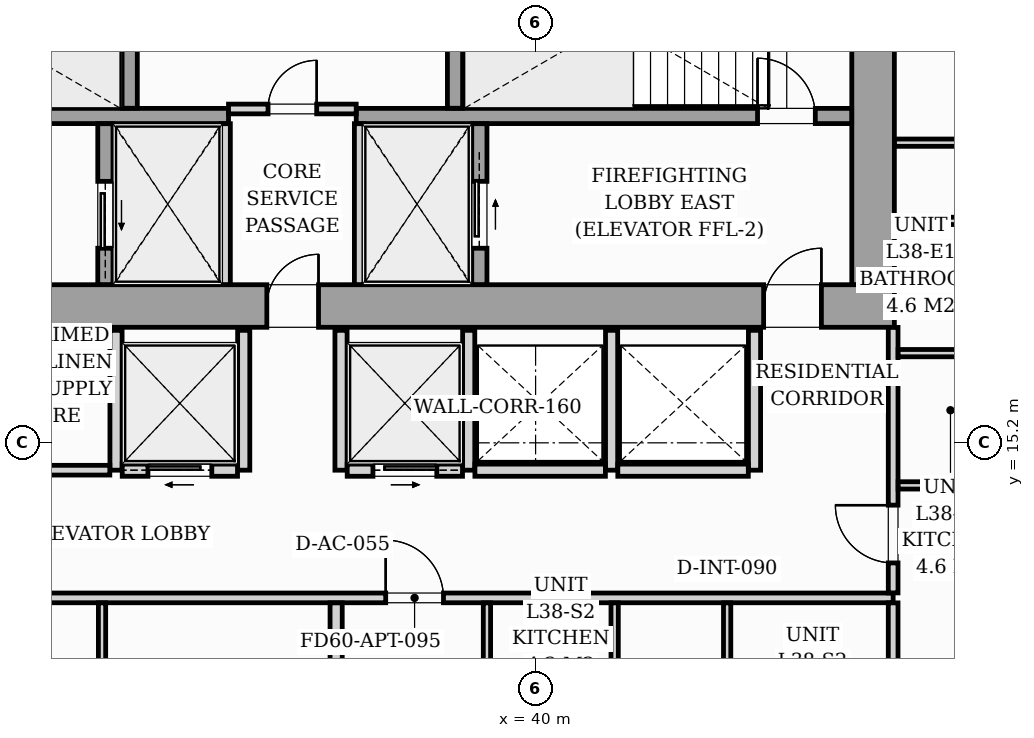
"""IFC4 building model, lengths in metres.
Left out: names, types, materials, properties, quantities, classifications, styles, units other than length and angle.
Written with IfcOpenShell. Run it as: python <this file> out.ifc"""

import sys

from ifc_helpers import new_model, si_unit, direction, frame, frame_2d, origin, origin_2d, place, context, subcontext, project, spatial, rectangle, i_section, extrude, source, transform, mapped, element, fill, save


model = new_model("IFC4")
c1 = context("Model", 3, precision=1e-05, world=origin(), true_north=direction((0.0, 1.0)))
c2 = subcontext(c1, "Body", "Model", "MODEL_VIEW")
j1 = project(units=[si_unit("LENGTHUNIT", "METRE"), si_unit("PLANEANGLEUNIT", "RADIAN")], contexts=[c1])
p1 = place(None, origin())
s1 = spatial("IfcSite", under=j1, at=p1, CompositionType="ELEMENT")
p2 = place(p1, origin())
s2 = spatial("IfcBuilding", under=s1, at=p2, CompositionType="ELEMENT")
p3 = place(p2, frame((0.0, 0.0, 134.2)))
s3 = spatial("IfcBuildingStorey", under=s2, at=p3, CompositionType="ELEMENT", Elevation=134.2)
m1 = source(origin(), c2, "Body", "SweptSolid", [
    extrude(i_section(OverallWidth=0.421, OverallDepth=0.465, WebThickness=0.045, FlangeThickness=0.073, FilletRadius=0.018, at=origin_2d()), origin(), (0.0, 0.0, 1.0), 3.196),
])
for number, where, z_axis, x_axis in (
    (1, (33.12, 17.4, 0.002), (0.0, 0.0, 1.0), (1.0, 0.0, 0.0)),
    (2, (38.88, 17.4, 0.002), (0.0, 0.0, 1.0), (1.0, 0.0, 0.0)),
    (3, (45.6, 17.4, 0.002), (0.0, 0.0, 1.0), (1.0, 0.0, 0.0)),
):
    element("IfcColumn", number, at=place(p3, frame(where, z_axis=z_axis, x_axis=x_axis)), inside=s3, PredefinedType="PILASTER", context=c2, shape_type="MappedRepresentation", body=[
        mapped(m1, transform((0.0, 0.0, 0.0), scale=1.0)),
    ])
p4 = place(p3, frame((26.1, 17.45, 0.0), z_axis=(0.0, 0.0, 1.0), x_axis=(1.0, 0.0, 0.0)))
e4 = element("IfcWall", 4, at=p4, inside=s3, PredefinedType="SHEAR", context=c2, shape_type="SweptSolid", body=[
    extrude(rectangle(XDim=19.8, YDim=0.7, at=frame_2d((9.9, 0.0))), origin(), (0.0, 0.0, 1.0), 3.2),
])
p5 = place(p4, frame((1.05, 0.0, 0.0)))
e5 = element("IfcOpeningElement", 5, at=p5, cuts=e4, PredefinedType="OPENING", context=c2, shape_type="SweptSolid", body=[
    extrude(rectangle(XDim=0.95, YDim=2.06, at=frame_2d((0.475, 1.03))), frame((0.0, 0.36, 0.0), z_axis=(0.0, -1.0, 0.0), x_axis=(1.0, 0.0, 0.0)), (0.0, 0.0, 1.0), 0.72),
])
p6 = place(p4, frame((9.48, 0.0, 0.0)))
e6 = element("IfcOpeningElement", 6, at=p6, cuts=e4, PredefinedType="OPENING", context=c2, shape_type="SweptSolid", body=[
    extrude(rectangle(XDim=0.85, YDim=2.0, at=frame_2d((0.425, 1.0))), frame((0.0, 0.36, 0.0), z_axis=(0.0, -1.0, 0.0), x_axis=(1.0, 0.0, 0.0)), (0.0, 0.0, 1.0), 0.72),
])
p7 = place(p4, frame((17.65, 0.0, 0.0)))
e7 = element("IfcOpeningElement", 7, at=p7, cuts=e4, PredefinedType="OPENING", context=c2, shape_type="SweptSolid", body=[
    extrude(rectangle(XDim=0.95, YDim=2.06, at=frame_2d((0.475, 1.03))), frame((0.0, 0.36, 0.0), z_axis=(0.0, -1.0, 0.0), x_axis=(1.0, 0.0, 0.0)), (0.0, 0.0, 1.0), 0.72),
])
p8 = place(p3, frame((45.55, 17.802, 0.0), z_axis=(0.0, 0.0, 1.0), x_axis=(0.0, 1.0, 0.0)))
e8 = element("IfcWall", 8, at=p8, inside=s3, PredefinedType="SHEAR", context=c2, shape_type="SweptSolid", body=[
    extrude(rectangle(XDim=5.796, YDim=0.7, at=frame_2d((2.898, 0.0))), origin(), (0.0, 0.0, 1.0), 3.2),
])
p9 = place(p3, frame((26.802, 20.575, 0.0), z_axis=(0.0, 0.0, 1.0), x_axis=(1.0, 0.0, 0.0)))
e9 = element("IfcWall", 9, at=p9, inside=s3, PredefinedType="SOLIDWALL", context=c2, shape_type="SweptSolid", body=[
    extrude(rectangle(XDim=8.148, YDim=0.25, at=frame_2d((4.074, 0.0))), origin(), (0.0, 0.0, 1.0), 3.2),
])
p10 = place(p9, frame((0.348, 0.0, 0.0)))
e10 = element("IfcOpeningElement", 10, at=p10, cuts=e9, PredefinedType="OPENING", context=c2, shape_type="SweptSolid", body=[
    extrude(rectangle(XDim=0.95, YDim=2.06, at=frame_2d((0.475, 1.03))), frame((0.0, 0.135, 0.0), z_axis=(0.0, -1.0, 0.0), x_axis=(1.0, 0.0, 0.0)), (0.0, 0.0, 1.0), 0.27),
])
p11 = place(p3, frame((37.05, 20.575, 0.0), z_axis=(0.0, 0.0, 1.0), x_axis=(1.0, 0.0, 0.0)))
e11 = element("IfcWall", 11, at=p11, inside=s3, PredefinedType="SOLIDWALL", context=c2, shape_type="SweptSolid", body=[
    extrude(rectangle(XDim=8.148, YDim=0.25, at=frame_2d((4.074, 0.0))), origin(), (0.0, 0.0, 1.0), 3.2),
])
p12 = place(p11, frame((6.6, 0.0, 0.0)))
e12 = element("IfcOpeningElement", 12, at=p12, cuts=e11, PredefinedType="OPENING", context=c2, shape_type="SweptSolid", body=[
    extrude(rectangle(XDim=0.95, YDim=2.06, at=frame_2d((0.475, 1.03))), frame((0.0, 0.135, 0.0), z_axis=(0.0, -1.0, 0.0), x_axis=(1.0, 0.0, 0.0)), (0.0, 0.0, 1.0), 0.27),
])
for number, where, z_axis, x_axis in (
    (13, (33.325, 20.702, 0.0), (0.0, 0.0, 1.0), (0.0, 1.0, 0.0)),
    (14, (38.675, 20.702, 0.0), (0.0, 0.0, 1.0), (0.0, 1.0, 0.0)),
):
    element("IfcWall", number, at=place(p3, frame(where, z_axis=z_axis, x_axis=x_axis)), inside=s3, PredefinedType="SOLIDWALL", context=c2, shape_type="SweptSolid", body=[
        extrude(rectangle(XDim=2.896, YDim=0.25, at=frame_2d((1.448, 0.0))), origin(), (0.0, 0.0, 1.0), 3.2),
    ])
p13 = place(p3, frame((32.925, 17.802, 0.0), z_axis=(0.0, 0.0, 1.0), x_axis=(0.0, 1.0, 0.0)))
e15 = element("IfcWall", 15, at=p13, inside=s3, PredefinedType="SOLIDWALL", context=c2, shape_type="SweptSolid", body=[
    extrude(rectangle(XDim=2.646, YDim=0.25, at=frame_2d((1.323, 0.0))), origin(), (0.0, 0.0, 1.0), 3.2),
])
p14 = place(p13, frame((0.598, 0.0, 0.0)))
e16 = element("IfcOpeningElement", 16, at=p14, cuts=e15, PredefinedType="OPENING", context=c2, shape_type="SweptSolid", body=[
    extrude(rectangle(XDim=1.1, YDim=2.08, at=frame_2d((0.55, 1.04))), frame((0.0, 0.135, 0.0), z_axis=(0.0, -1.0, 0.0), x_axis=(1.0, 0.0, 0.0)), (0.0, 0.0, 1.0), 0.27),
])
for number, where, z_axis, x_axis in (
    (17, (34.9, 17.802, 0.0), (0.0, 0.0, 1.0), (0.0, 1.0, 0.0)),
    (18, (37.1, 17.802, 0.0), (0.0, 0.0, 1.0), (0.0, 1.0, 0.0)),
):
    element("IfcWall", number, at=place(p3, frame(where, z_axis=z_axis, x_axis=x_axis)), inside=s3, PredefinedType="PARTITIONING", context=c2, shape_type="SweptSolid", body=[
        extrude(rectangle(XDim=2.646, YDim=0.16, at=frame_2d((1.323, 0.0))), origin(), (0.0, 0.0, 1.0), 2.94),
    ])
p15 = place(p3, frame((39.075, 17.802, 0.0), z_axis=(0.0, 0.0, 1.0), x_axis=(0.0, 1.0, 0.0)))
e19 = element("IfcWall", 19, at=p15, inside=s3, PredefinedType="SOLIDWALL", context=c2, shape_type="SweptSolid", body=[
    extrude(rectangle(XDim=2.646, YDim=0.25, at=frame_2d((1.323, 0.0))), origin(), (0.0, 0.0, 1.0), 3.2),
])
p16 = place(p15, frame((0.598, 0.0, 0.0)))
e20 = element("IfcOpeningElement", 20, at=p16, cuts=e19, PredefinedType="OPENING", context=c2, shape_type="SweptSolid", body=[
    extrude(rectangle(XDim=1.1, YDim=2.08, at=frame_2d((0.55, 1.04))), frame((0.0, 0.135, 0.0), z_axis=(0.0, -1.0, 0.0), x_axis=(1.0, 0.0, 0.0)), (0.0, 0.0, 1.0), 0.27),
])
p17 = place(p3, frame((34.95, 20.69, 0.0), z_axis=(0.0, 0.0, 1.0), x_axis=(1.0, 0.0, 0.0)))
e21 = element("IfcWall", 21, at=p17, inside=s3, PredefinedType="PARTITIONING", context=c2, shape_type="SweptSolid", body=[
    extrude(rectangle(XDim=2.1, YDim=0.16, at=frame_2d((1.05, 0.0))), origin(), (0.0, 0.0, 1.0), 2.94),
])
p18 = place(p17, frame((0.65, 0.0, 0.0)))
e22 = element("IfcOpeningElement", 22, at=p18, cuts=e21, PredefinedType="OPENING", context=c2, shape_type="SweptSolid", body=[
    extrude(rectangle(XDim=0.8, YDim=2.05, at=frame_2d((0.4, 1.025))), frame((0.0, 0.09, 0.0), z_axis=(0.0, -1.0, 0.0), x_axis=(1.0, 0.0, 0.0)), (0.0, 0.0, 1.0), 0.18),
])
p19 = place(p3, frame((33.1, 14.75, 0.0), z_axis=(0.0, 0.0, 1.0), x_axis=(0.0, 1.0, 0.0)))
e23 = element("IfcWall", 23, at=p19, inside=s3, PredefinedType="PARTITIONING", context=c2, shape_type="SweptSolid", body=[
    extrude(rectangle(XDim=2.3, YDim=0.2, at=frame_2d((1.15, 0.0))), origin(), (0.0, 0.0, 1.0), 2.94),
])
p20 = place(p3, frame((28.482, 14.75, 0.0), z_axis=(0.0, 0.0, 1.0), x_axis=(1.0, 0.0, 0.0)))
e24 = element("IfcWall", 24, at=p20, inside=s3, PredefinedType="PARTITIONING", context=c2, shape_type="SweptSolid", body=[
    extrude(rectangle(XDim=4.516, YDim=0.16, at=frame_2d((2.258, 0.0))), origin(), (0.0, 0.0, 1.0), 2.94),
])
p21 = place(p20, frame((1.868, 0.0, 0.0)))
e25 = element("IfcOpeningElement", 25, at=p21, cuts=e24, PredefinedType="OPENING", context=c2, shape_type="SweptSolid", body=[
    extrude(rectangle(XDim=0.8, YDim=2.05, at=frame_2d((0.4, 1.025))), frame((0.0, 0.09, 0.0), z_axis=(0.0, -1.0, 0.0), x_axis=(1.0, 0.0, 0.0)), (0.0, 0.0, 1.0), 0.18),
])
p22 = place(p3, frame((35.2, 14.75, 0.0), z_axis=(0.0, 0.0, 1.0), x_axis=(0.0, 1.0, 0.0)))
e26 = element("IfcWall", 26, at=p22, inside=s3, PredefinedType="PARTITIONING", context=c2, shape_type="SweptSolid", body=[
    extrude(rectangle(XDim=2.3, YDim=0.2, at=frame_2d((1.15, 0.0))), origin(), (0.0, 0.0, 1.0), 2.94),
])
p23 = place(p3, frame((33.202, 14.75, 0.0), z_axis=(0.0, 0.0, 1.0), x_axis=(1.0, 0.0, 0.0)))
e27 = element("IfcWall", 27, at=p23, inside=s3, PredefinedType="PARTITIONING", context=c2, shape_type="SweptSolid", body=[
    extrude(rectangle(XDim=1.896, YDim=0.2, at=frame_2d((0.948, 0.0))), origin(), (0.0, 0.0, 1.0), 2.94),
])
p24 = place(p23, frame((0.423, 0.0, 0.0)))
e28 = element("IfcOpeningElement", 28, at=p24, cuts=e27, PredefinedType="OPENING", context=c2, shape_type="SweptSolid", body=[
    extrude(rectangle(XDim=1.05, YDim=2.08, at=frame_2d((0.525, 1.04))), frame((0.0, 0.11, 0.0), z_axis=(0.0, -1.0, 0.0), x_axis=(1.0, 0.0, 0.0)), (0.0, 0.0, 1.0), 0.22),
])
for number, where, z_axis, x_axis in (
    (29, (36.8, 14.75, 0.0), (0.0, 0.0, 1.0), (0.0, 1.0, 0.0)),
    (30, (38.9, 14.75, 0.0), (0.0, 0.0, 1.0), (0.0, 1.0, 0.0)),
):
    element("IfcWall", number, at=place(p3, frame(where, z_axis=z_axis, x_axis=x_axis)), inside=s3, PredefinedType="PARTITIONING", context=c2, shape_type="SweptSolid", body=[
        extrude(rectangle(XDim=2.3, YDim=0.2, at=frame_2d((1.15, 0.0))), origin(), (0.0, 0.0, 1.0), 2.94),
    ])
p25 = place(p3, frame((36.902, 14.75, 0.0), z_axis=(0.0, 0.0, 1.0), x_axis=(1.0, 0.0, 0.0)))
e31 = element("IfcWall", 31, at=p25, inside=s3, PredefinedType="PARTITIONING", context=c2, shape_type="SweptSolid", body=[
    extrude(rectangle(XDim=1.896, YDim=0.2, at=frame_2d((0.948, 0.0))), origin(), (0.0, 0.0, 1.0), 2.94),
])
p26 = place(p25, frame((0.423, 0.0, 0.0)))
e32 = element("IfcOpeningElement", 32, at=p26, cuts=e31, PredefinedType="OPENING", context=c2, shape_type="SweptSolid", body=[
    extrude(rectangle(XDim=1.05, YDim=2.08, at=frame_2d((0.525, 1.04))), frame((0.0, 0.11, 0.0), z_axis=(0.0, -1.0, 0.0), x_axis=(1.0, 0.0, 0.0)), (0.0, 0.0, 1.0), 0.22),
])
for number, where, z_axis, x_axis in (
    (33, (41.25, 14.75, 0.0), (0.0, 0.0, 1.0), (0.0, 1.0, 0.0)),
    (34, (43.6, 14.75, 0.0), (0.0, 0.0, 1.0), (0.0, 1.0, 0.0)),
):
    element("IfcWall", number, at=place(p3, frame(where, z_axis=z_axis, x_axis=x_axis)), inside=s3, PredefinedType="PARTITIONING", context=c2, shape_type="SweptSolid", body=[
        extrude(rectangle(XDim=2.3, YDim=0.2, at=frame_2d((1.15, 0.0))), origin(), (0.0, 0.0, 1.0), 2.94),
    ])
for number, where, z_axis, x_axis in (
    (35, (39.002, 14.75, 0.0), (0.0, 0.0, 1.0), (1.0, 0.0, 0.0)),
    (36, (41.352, 14.75, 0.0), (0.0, 0.0, 1.0), (1.0, 0.0, 0.0)),
):
    element("IfcWall", number, at=place(p3, frame(where, z_axis=z_axis, x_axis=x_axis)), inside=s3, PredefinedType="PARTITIONING", context=c2, shape_type="SweptSolid", body=[
        extrude(rectangle(XDim=2.146, YDim=0.2, at=frame_2d((1.073, 0.0))), origin(), (0.0, 0.0, 1.0), 2.94),
    ])
p27 = place(p3, frame((22.05, 12.65, 0.0), z_axis=(0.0, 0.0, 1.0), x_axis=(1.0, 0.0, 0.0)))
e37 = element("IfcWall", 37, at=p27, inside=s3, PredefinedType="PARTITIONING", context=c2, shape_type="SweptSolid", body=[
    extrude(rectangle(XDim=23.83, YDim=0.16, at=frame_2d((11.915, 0.0))), origin(), (0.0, 0.0, 1.0), 2.94),
])
p28 = place(p27, frame((3.0, 0.0, 0.0)))
e38 = element("IfcOpeningElement", 38, at=p28, cuts=e37, PredefinedType="OPENING", context=c2, shape_type="SweptSolid", body=[
    extrude(rectangle(XDim=0.95, YDim=2.06, at=frame_2d((0.475, 1.03))), frame((0.0, 0.09, 0.0), z_axis=(0.0, -1.0, 0.0), x_axis=(1.0, 0.0, 0.0)), (0.0, 0.0, 1.0), 0.18),
])
p29 = place(p27, frame((15.485, 0.0, 0.0)))
e39 = element("IfcOpeningElement", 39, at=p29, cuts=e37, PredefinedType="OPENING", context=c2, shape_type="SweptSolid", body=[
    extrude(rectangle(XDim=0.95, YDim=2.06, at=frame_2d((0.475, 1.03))), frame((0.0, 0.09, 0.0), z_axis=(0.0, -1.0, 0.0), x_axis=(1.0, 0.0, 0.0)), (0.0, 0.0, 1.0), 0.18),
])
p30 = place(p3, frame((45.88, 5.958, 0.0), z_axis=(0.0, 0.0, 1.0), x_axis=(0.0, 1.0, 0.0)))
e40 = element("IfcWall", 40, at=p30, inside=s3, PredefinedType="PARTITIONING", context=c2, shape_type="SweptSolid", body=[
    extrude(rectangle(XDim=6.61, YDim=0.16, at=frame_2d((3.305, 0.0))), origin(), (0.0, 0.0, 1.0), 2.94),
])
p31 = place(p3, frame((45.88, 12.732, 0.0), z_axis=(0.0, 0.0, 1.0), x_axis=(0.0, 1.0, 0.0)))
e41 = element("IfcWall", 41, at=p31, inside=s3, PredefinedType="PARTITIONING", context=c2, shape_type="SweptSolid", body=[
    extrude(rectangle(XDim=4.366, YDim=0.16, at=frame_2d((2.183, 0.0))), origin(), (0.0, 0.0, 1.0), 2.94),
])
p32 = place(p31, frame((0.493, 0.0, 0.0)))
e42 = element("IfcOpeningElement", 42, at=p32, cuts=e41, PredefinedType="OPENING", context=c2, shape_type="SweptSolid", body=[
    extrude(rectangle(XDim=0.95, YDim=2.06, at=frame_2d((0.475, 1.03))), frame((0.0, 0.09, 0.0), z_axis=(0.0, -1.0, 0.0), x_axis=(1.0, 0.0, 0.0)), (0.0, 0.0, 1.0), 0.18),
])
p33 = place(p3, frame((32.87, 7.028, 0.0), z_axis=(0.0, 0.0, 1.0), x_axis=(0.0, 1.0, 0.0)))
e43 = element("IfcWall", 43, at=p33, inside=s3, PredefinedType="PARTITIONING", context=c2, shape_type="SweptSolid", body=[
    extrude(rectangle(XDim=5.54, YDim=0.12, at=frame_2d((2.77, 0.0))), origin(), (0.0, 0.0, 1.0), 2.94),
])
p34 = place(p33, frame((2.272, 0.0, 0.0)))
e44 = element("IfcOpeningElement", 44, at=p34, cuts=e43, PredefinedType="OPENING", context=c2, shape_type="SweptSolid", body=[
    extrude(rectangle(XDim=0.9, YDim=2.05, at=frame_2d((0.45, 1.025))), frame((0.0, 0.07, 0.0), z_axis=(0.0, -1.0, 0.0), x_axis=(1.0, 0.0, 0.0)), (0.0, 0.0, 1.0), 0.14),
])
p35 = place(p3, frame((36.72, 6.658, 0.0), z_axis=(0.0, 0.0, 1.0), x_axis=(0.0, 1.0, 0.0)))
e45 = element("IfcWall", 45, at=p35, inside=s3, PredefinedType="PARTITIONING", context=c2, shape_type="SweptSolid", body=[
    extrude(rectangle(XDim=5.91, YDim=0.2, at=frame_2d((2.955, 0.0))), origin(), (0.0, 0.0, 1.0), 2.94),
])
p36 = place(p3, frame((43.15, 6.221, 0.0), z_axis=(0.0, 0.0, 1.0), x_axis=(0.0, 1.0, 0.0)))
e46 = element("IfcWall", 46, at=p36, inside=s3, PredefinedType="PARTITIONING", context=c2, shape_type="SweptSolid", body=[
    extrude(rectangle(XDim=6.347, YDim=0.12, at=frame_2d((3.173, 0.0))), origin(), (0.0, 0.0, 1.0), 2.94),
])
p37 = place(p36, frame((3.079, 0.0, 0.0)))
e47 = element("IfcOpeningElement", 47, at=p37, cuts=e46, PredefinedType="OPENING", context=c2, shape_type="SweptSolid", body=[
    extrude(rectangle(XDim=0.9, YDim=2.05, at=frame_2d((0.45, 1.025))), frame((0.0, 0.07, 0.0), z_axis=(0.0, -1.0, 0.0), x_axis=(1.0, 0.0, 0.0)), (0.0, 0.0, 1.0), 0.14),
])
for number, where, z_axis, x_axis in (
    (48, (41.3, 10.462, 0.0), (0.0, 0.0, 1.0), (0.0, 1.0, 0.0)),
    (49, (39.2, 10.462, 0.0), (0.0, 0.0, 1.0), (0.0, 1.0, 0.0)),
):
    element("IfcWall", number, at=place(p3, frame(where, z_axis=z_axis, x_axis=x_axis)), inside=s3, PredefinedType="PARTITIONING", context=c2, shape_type="SweptSolid", body=[
        extrude(rectangle(XDim=2.106, YDim=0.12, at=frame_2d((1.053, 0.0))), origin(), (0.0, 0.0, 1.0), 2.94),
    ])
p38 = place(p3, frame((45.962, 16.675, 0.0), z_axis=(0.0, 0.0, 1.0), x_axis=(1.0, 0.0, 0.0)))
e50 = element("IfcWall", 50, at=p38, inside=s3, PredefinedType="PARTITIONING", context=c2, shape_type="SweptSolid", body=[
    extrude(rectangle(XDim=2.256, YDim=0.12, at=frame_2d((1.128, 0.0))), origin(), (0.0, 0.0, 1.0), 2.063),
])
p39 = place(p3, frame((45.962, 14.5, 0.0), z_axis=(0.0, 0.0, 1.0), x_axis=(1.0, 0.0, 0.0)))
e51 = element("IfcWall", 51, at=p39, inside=s3, PredefinedType="PARTITIONING", context=c2, shape_type="SweptSolid", body=[
    extrude(rectangle(XDim=2.256, YDim=0.12, at=frame_2d((1.128, 0.0))), origin(), (0.0, 0.0, 1.0), 2.94),
])
p40 = place(p3, frame((45.902, 18.85, 0.0), z_axis=(0.0, 0.0, 1.0), x_axis=(1.0, 0.0, 0.0)))
e52 = element("IfcWall", 52, at=p40, inside=s3, PredefinedType="PARTITIONING", context=c2, shape_type="SweptSolid", body=[
    extrude(rectangle(XDim=2.316, YDim=0.12, at=frame_2d((1.158, 0.0))), origin(), (0.0, 0.0, 1.0), 2.94),
])
p41 = place(p3, frame((45.902, 20.136, 0.0), z_axis=(0.0, 0.0, 1.0), x_axis=(1.0, 0.0, 0.0)))
e53 = element("IfcWall", 53, at=p41, inside=s3, PredefinedType="PARTITIONING", context=c2, shape_type="SweptSolid", body=[
    extrude(rectangle(XDim=14.063, YDim=0.12, at=frame_2d((7.031, 0.0))), origin(), (0.0, 0.0, 1.0), 2.94),
])
p42 = place(p41, frame((6.708, 0.0, 0.0)))
e54 = element("IfcOpeningElement", 54, at=p42, cuts=e53, PredefinedType="OPENING", context=c2, shape_type="SweptSolid", body=[
    extrude(rectangle(XDim=0.85, YDim=2.05, at=frame_2d((0.425, 1.025))), frame((0.0, 0.07, 0.0), z_axis=(0.0, -1.0, 0.0), x_axis=(1.0, 0.0, 0.0)), (0.0, 0.0, 1.0), 0.14),
])
m2 = source(origin(), c2, "Body", "SweptSolid", [
    extrude(rectangle(XDim=0.85, YDim=2.0, at=frame_2d((0.425, 1.0))), frame((0.0, 0.025, 0.0), z_axis=(0.0, -1.0, 0.0), x_axis=(1.0, 0.0, 0.0)), (0.0, 0.0, 1.0), 0.05),
])
p43 = place(p6, origin())
e55 = element("IfcDoor", 55, at=p43, inside=s3, OperationType="SINGLE_SWING_RIGHT", PredefinedType="DOOR", context=c2, shape_type="MappedRepresentation", body=[
    mapped(m2, transform((0.0, 0.0, 0.0), scale=1.0)),
])
fill(e6, e55)
m3 = source(origin(), c2, "Body", "SweptSolid", [
    extrude(rectangle(XDim=0.95, YDim=2.06, at=frame_2d((0.475, 1.03))), frame((0.0, 0.025, 0.0), z_axis=(0.0, -1.0, 0.0), x_axis=(1.0, 0.0, 0.0)), (0.0, 0.0, 1.0), 0.05),
])
p44 = place(p7, origin())
e56 = element("IfcDoor", 56, at=p44, inside=s3, OperationType="SINGLE_SWING_RIGHT", PredefinedType="DOOR", context=c2, shape_type="MappedRepresentation", body=[
    mapped(m3, transform((0.0, 0.0, 0.0), scale=1.0)),
])
fill(e7, e56)
p45 = place(p12, origin())
e57 = element("IfcDoor", 57, at=p45, inside=s3, OperationType="SINGLE_SWING_LEFT", PredefinedType="DOOR", context=c2, shape_type="MappedRepresentation", body=[
    mapped(m3, transform((0.0, 0.0, 0.0), scale=1.0)),
])
fill(e12, e57)
m4 = source(origin(), c2, "Body", "SweptSolid", [
    extrude(rectangle(XDim=1.1, YDim=2.08, at=frame_2d((0.55, 1.04))), frame((0.0, 0.025, 0.0), z_axis=(0.0, -1.0, 0.0), x_axis=(1.0, 0.0, 0.0)), (0.0, 0.0, 1.0), 0.05),
])
p46 = place(p14, origin())
e58 = element("IfcDoor", 58, at=p46, inside=s3, OperationType="SLIDING_TO_LEFT", PredefinedType="DOOR", context=c2, shape_type="MappedRepresentation", body=[
    mapped(m4, transform((0.0, 0.0, 0.0), scale=1.0)),
])
fill(e16, e58)
p47 = place(p16, origin())
e59 = element("IfcDoor", 59, at=p47, inside=s3, OperationType="SLIDING_TO_RIGHT", PredefinedType="DOOR", context=c2, shape_type="MappedRepresentation", body=[
    mapped(m4, transform((0.0, 0.0, 0.0), scale=1.0)),
])
fill(e20, e59)
m5 = source(origin(), c2, "Body", "SweptSolid", [
    extrude(rectangle(XDim=0.8, YDim=2.05, at=frame_2d((0.4, 1.025))), frame((0.0, 0.025, 0.0), z_axis=(0.0, -1.0, 0.0), x_axis=(1.0, 0.0, 0.0)), (0.0, 0.0, 1.0), 0.05),
])
p48 = place(p18, origin())
e60 = element("IfcDoor", 60, at=p48, inside=s3, OperationType="SINGLE_SWING_RIGHT", PredefinedType="DOOR", context=c2, shape_type="MappedRepresentation", body=[
    mapped(m5, transform((0.0, 0.0, 0.0), scale=1.0)),
])
fill(e22, e60)
m6 = source(origin(), c2, "Body", "SweptSolid", [
    extrude(rectangle(XDim=1.05, YDim=2.08, at=frame_2d((0.525, 1.04))), frame((0.0, 0.025, 0.0), z_axis=(0.0, -1.0, 0.0), x_axis=(1.0, 0.0, 0.0)), (0.0, 0.0, 1.0), 0.05),
])
p49 = place(p24, origin())
e61 = element("IfcDoor", 61, at=p49, inside=s3, OperationType="SLIDING_TO_LEFT", PredefinedType="DOOR", context=c2, shape_type="MappedRepresentation", body=[
    mapped(m6, transform((0.0, 0.0, 0.0), scale=1.0)),
])
fill(e28, e61)
p50 = place(p26, origin())
e62 = element("IfcDoor", 62, at=p50, inside=s3, OperationType="SLIDING_TO_RIGHT", PredefinedType="DOOR", context=c2, shape_type="MappedRepresentation", body=[
    mapped(m6, transform((0.0, 0.0, 0.0), scale=1.0)),
])
fill(e32, e62)
m7 = source(origin(), c2, "Body", "SweptSolid", [
    extrude(rectangle(XDim=0.95, YDim=2.06, at=frame_2d((0.475, 1.03))), frame((0.0, 0.025, 0.0), z_axis=(0.0, -1.0, 0.0), x_axis=(1.0, 0.0, 0.0)), (0.0, 0.0, 1.0), 0.05),
])
p51 = place(p29, origin())
e63 = element("IfcDoor", 63, at=p51, inside=s3, OperationType="SINGLE_SWING_LEFT", PredefinedType="DOOR", context=c2, shape_type="MappedRepresentation", body=[
    mapped(m7, transform((0.0, 0.0, 0.0), scale=1.0)),
])
fill(e39, e63)
p52 = place(p32, origin())
e64 = element("IfcDoor", 64, at=p52, inside=s3, OperationType="SINGLE_SWING_RIGHT", PredefinedType="DOOR", context=c2, shape_type="MappedRepresentation", body=[
    mapped(m7, transform((0.0, 0.0, 0.0), scale=1.0)),
])
fill(e42, e64)
save(model, sys.argv[1])
